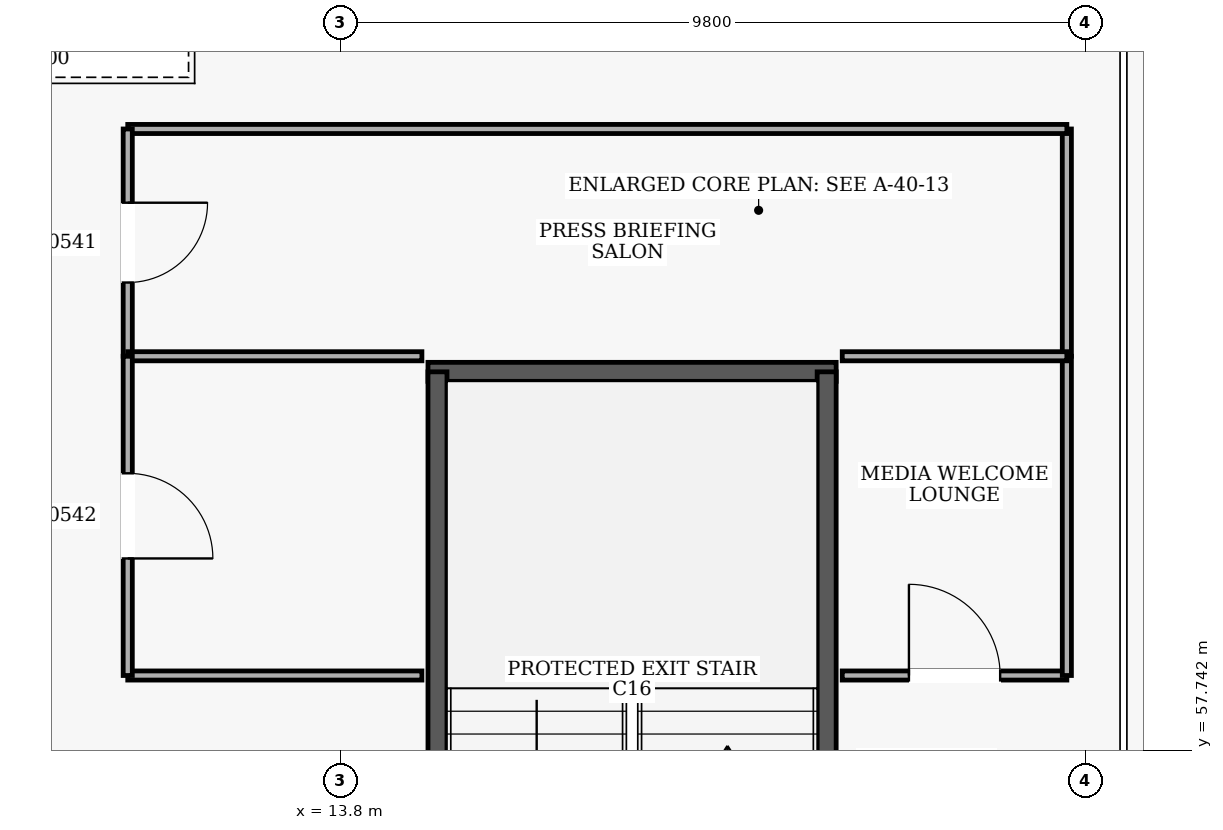
"""IFC4 building model, lengths in metres.
Left out: names, types, materials, properties, quantities, classifications, styles, units other than length and angle.
Written with IfcOpenShell. Run it as: python <this file> out.ifc"""

import sys

from ifc_helpers import new_model, si_unit, direction, frame, frame_2d, origin, place, context, subcontext, project, spatial, rectangle, extrude, element, fill, save


model = new_model("IFC4")
c1 = context("Model", 3, precision=1e-05, world=origin(), true_north=direction((0.0, 1.0)))
c2 = subcontext(c1, "Body", "Model", "MODEL_VIEW")
j1 = project(units=[si_unit("LENGTHUNIT", "METRE"), si_unit("PLANEANGLEUNIT", "RADIAN")], contexts=[c1])
p1 = place(None, origin())
s1 = spatial("IfcSite", under=j1, at=p1, CompositionType="ELEMENT")
p2 = place(p1, origin())
s2 = spatial("IfcBuilding", under=s1, at=p2, CompositionType="ELEMENT")
p3 = place(p2, frame((0.0, 0.0, 5.4)))
s3 = spatial("IfcBuildingStorey", under=s2, at=p3, CompositionType="ELEMENT", Elevation=5.4)
p4 = place(p3, frame((20.32, 62.725, 0.0), z_axis=(0.0, 0.0, 1.0), x_axis=(-1.0, 0.0, 0.0)))
e1 = element("IfcWall", 1, at=p4, inside=s3, PredefinedType="SHEAR", context=c2, shape_type="SweptSolid", body=[
    extrude(rectangle(XDim=5.37, YDim=0.25, at=frame_2d((2.685, 0.0))), origin(), (0.0, 0.0, 1.0), 4.5),
])
p5 = place(p3, frame((15.075, 51.875, 0.0), z_axis=(0.0, 0.0, 1.0), x_axis=(0.0, 1.0, 0.0)))
e2 = element("IfcWall", 2, at=p5, inside=s3, PredefinedType="SHEAR", context=c2, shape_type="SweptSolid", body=[
    extrude(rectangle(XDim=10.85, YDim=0.25, at=frame_2d((5.425, 0.0))), origin(), (0.0, 0.0, 1.0), 4.5),
])
p6 = place(p5, frame((0.52, 0.0, 0.0)))
e3 = element("IfcOpeningElement", 3, at=p6, cuts=e2, PredefinedType="OPENING", context=c2, shape_type="SweptSolid", body=[
    extrude(rectangle(XDim=1.4, YDim=2.15, at=frame_2d((0.7, 1.075))), frame((0.0, 0.135, 0.0), z_axis=(0.0, -1.0, 0.0), x_axis=(1.0, 0.0, 0.0)), (0.0, 0.0, 1.0), 0.27),
])
p7 = place(p3, frame((20.195, 51.875, 0.0), z_axis=(0.0, 0.0, 1.0), x_axis=(0.0, 1.0, 0.0)))
e4 = element("IfcWall", 4, at=p7, inside=s3, PredefinedType="SHEAR", context=c2, shape_type="SweptSolid", body=[
    extrude(rectangle(XDim=10.85, YDim=0.25, at=frame_2d((5.425, 0.0))), origin(), (0.0, 0.0, 1.0), 4.5),
])
p8 = place(p3, frame((23.355, 62.93, 0.0), z_axis=(0.0, 0.0, 1.0), x_axis=(0.0, 1.0, 0.0)))
e5 = element("IfcWall", 5, at=p8, inside=s3, PredefinedType="PARTITIONING", context=c2, shape_type="SweptSolid", body=[
    extrude(rectangle(XDim=2.99, YDim=0.12, at=frame_2d((1.495, 0.0))), origin(), (0.0, 0.0, 1.0), 4.03),
])
p9 = place(p3, frame((23.355, 65.92, 0.0), z_axis=(0.0, 0.0, 1.0), x_axis=(-1.0, 0.0, 0.0)))
e6 = element("IfcWall", 6, at=p9, inside=s3, PredefinedType="PARTITIONING", context=c2, shape_type="SweptSolid", body=[
    extrude(rectangle(XDim=12.355, YDim=0.12, at=frame_2d((6.177, 0.0))), origin(), (0.0, 0.0, 1.0), 4.5),
])
p10 = place(p3, frame((11.0, 65.92, 0.0), z_axis=(0.0, 0.0, 1.0), x_axis=(0.0, -1.0, 0.0)))
e7 = element("IfcWall", 7, at=p10, inside=s3, PredefinedType="PARTITIONING", context=c2, shape_type="SweptSolid", body=[
    extrude(rectangle(XDim=2.99, YDim=0.12, at=frame_2d((1.495, 0.0))), origin(), (0.0, 0.0, 1.0), 4.5),
])
p11 = place(p10, frame((0.97, 0.0, 0.0)))
e8 = element("IfcOpeningElement", 8, at=p11, cuts=e7, PredefinedType="OPENING", context=c2, shape_type="SweptSolid", body=[
    extrude(rectangle(XDim=1.05, YDim=2.15, at=frame_2d((0.525, 1.075))), frame((0.0, 0.07, 0.0), z_axis=(0.0, -1.0, 0.0), x_axis=(1.0, 0.0, 0.0)), (0.0, 0.0, 1.0), 0.14),
])
for number, where, z_axis, x_axis in (
    (9, (11.0, 58.73, 0.0), (0.0, 0.0, 1.0), (1.0, 0.0, 0.0)),
    (10, (14.87, 62.93, 0.0), (0.0, 0.0, 1.0), (-1.0, 0.0, 0.0)),
):
    element("IfcWall", number, at=place(p3, frame(where, z_axis=z_axis, x_axis=x_axis)), inside=s3, PredefinedType="PARTITIONING", context=c2, shape_type="SweptSolid", body=[
        extrude(rectangle(XDim=3.87, YDim=0.12, at=frame_2d((1.935, 0.0))), origin(), (0.0, 0.0, 1.0), 4.5),
    ])
p12 = place(p3, frame((11.0, 62.93, 0.0), z_axis=(0.0, 0.0, 1.0), x_axis=(0.0, -1.0, 0.0)))
e11 = element("IfcWall", 11, at=p12, inside=s3, PredefinedType="PARTITIONING", context=c2, shape_type="SweptSolid", body=[
    extrude(rectangle(XDim=4.2, YDim=0.12, at=frame_2d((2.1, 0.0))), origin(), (0.0, 0.0, 1.0), 4.5),
])
p13 = place(p12, frame((1.54, 0.0, 0.0)))
e12 = element("IfcOpeningElement", 12, at=p13, cuts=e11, PredefinedType="OPENING", context=c2, shape_type="SweptSolid", body=[
    extrude(rectangle(XDim=1.12, YDim=2.15, at=frame_2d((0.56, 1.075))), frame((0.0, 0.07, 0.0), z_axis=(0.0, -1.0, 0.0), x_axis=(1.0, 0.0, 0.0)), (0.0, 0.0, 1.0), 0.14),
])
p14 = place(p3, frame((20.4, 58.73, 0.0), z_axis=(0.0, 0.0, 1.0), x_axis=(1.0, 0.0, 0.0)))
e13 = element("IfcWall", 13, at=p14, inside=s3, PredefinedType="PARTITIONING", context=c2, shape_type="SweptSolid", body=[
    extrude(rectangle(XDim=2.955, YDim=0.12, at=frame_2d((1.478, 0.0))), origin(), (0.0, 0.0, 1.0), 4.5),
])
p15 = place(p14, frame((0.877, 0.0, 0.0)))
e14 = element("IfcOpeningElement", 14, at=p15, cuts=e13, PredefinedType="OPENING", context=c2, shape_type="SweptSolid", body=[
    extrude(rectangle(XDim=1.2, YDim=2.15, at=frame_2d((0.6, 1.075))), frame((0.0, 0.07, 0.0), z_axis=(0.0, -1.0, 0.0), x_axis=(1.0, 0.0, 0.0)), (0.0, 0.0, 1.0), 0.14),
])
p16 = place(p3, frame((23.355, 58.73, 0.0), z_axis=(0.0, 0.0, 1.0), x_axis=(0.0, 1.0, 0.0)))
e15 = element("IfcWall", 15, at=p16, inside=s3, PredefinedType="PARTITIONING", context=c2, shape_type="SweptSolid", body=[
    extrude(rectangle(XDim=4.2, YDim=0.12, at=frame_2d((2.1, 0.0))), origin(), (0.0, 0.0, 1.0), 4.03),
])
p17 = place(p3, frame((23.355, 62.93, 0.0), z_axis=(0.0, 0.0, 1.0), x_axis=(-1.0, 0.0, 0.0)))
e16 = element("IfcWall", 16, at=p17, inside=s3, PredefinedType="PARTITIONING", context=c2, shape_type="SweptSolid", body=[
    extrude(rectangle(XDim=2.955, YDim=0.12, at=frame_2d((1.478, 0.0))), origin(), (0.0, 0.0, 1.0), 4.5),
])
p18 = place(p11, origin())
e17 = element("IfcDoor", 17, at=p18, inside=s3, OperationType="SINGLE_SWING_LEFT", PredefinedType="DOOR", context=c2, shape_type="SweptSolid", body=[
    extrude(rectangle(XDim=1.05, YDim=2.15, at=frame_2d((0.525, 1.075))), frame((0.0, 0.025, 0.0), z_axis=(0.0, -1.0, 0.0), x_axis=(1.0, 0.0, 0.0)), (0.0, 0.0, 1.0), 0.05),
])
fill(e8, e17)
p19 = place(p13, origin())
e18 = element("IfcDoor", 18, at=p19, inside=s3, OperationType="SINGLE_SWING_RIGHT", PredefinedType="DOOR", context=c2, shape_type="SweptSolid", body=[
    extrude(rectangle(XDim=1.12, YDim=2.15, at=frame_2d((0.56, 1.075))), frame((0.0, 0.025, 0.0), z_axis=(0.0, -1.0, 0.0), x_axis=(1.0, 0.0, 0.0)), (0.0, 0.0, 1.0), 0.05),
])
fill(e12, e18)
p20 = place(p15, origin())
e19 = element("IfcDoor", 19, at=p20, inside=s3, OperationType="SINGLE_SWING_LEFT", PredefinedType="DOOR", context=c2, shape_type="SweptSolid", body=[
    extrude(rectangle(XDim=1.2, YDim=2.15, at=frame_2d((0.6, 1.075))), frame((0.0, 0.025, 0.0), z_axis=(0.0, -1.0, 0.0), x_axis=(1.0, 0.0, 0.0)), (0.0, 0.0, 1.0), 0.05),
])
fill(e14, e19)
save(model, sys.argv[1])
